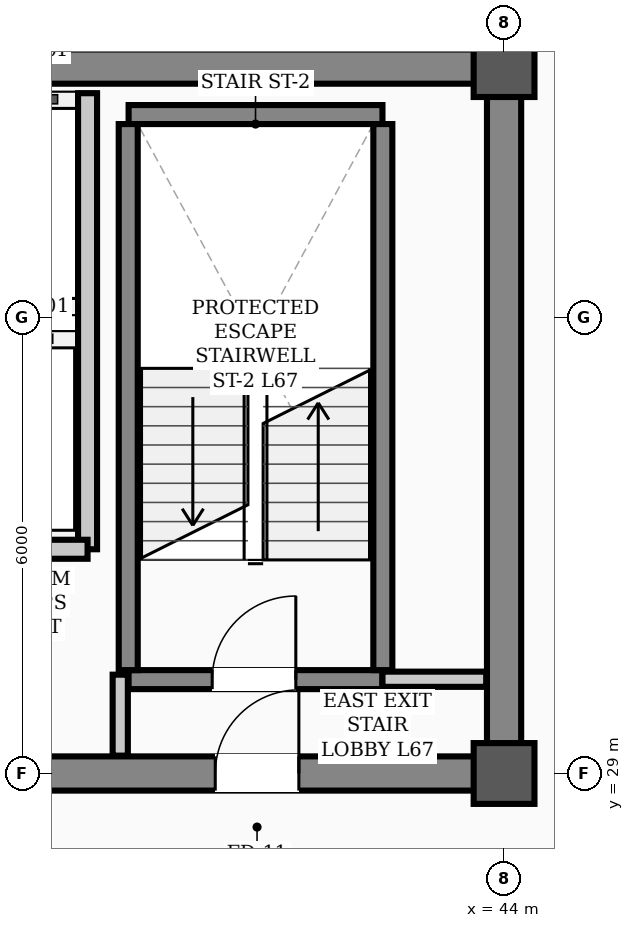
"""IFC4 building model, lengths in metres.
Left out: names, types, materials, properties, quantities, classifications, styles, units other than length and angle.
Written with IfcOpenShell. Run it as: python <this file> out.ifc"""

import sys

from ifc_helpers import new_model, si_unit, direction, frame, frame_2d, origin, origin_2d, place, context, subcontext, project, spatial, rectangle, hollow_rectangle, extrude, element, fill, save


model = new_model("IFC4")
c1 = context("Model", 3, precision=1e-05, world=origin(), true_north=direction((0.0, 1.0)))
c2 = subcontext(c1, "Body", "Model", "MODEL_VIEW")
j1 = project(units=[si_unit("LENGTHUNIT", "METRE"), si_unit("PLANEANGLEUNIT", "RADIAN")], contexts=[c1])
p1 = place(None, origin())
s1 = spatial("IfcSite", under=j1, at=p1, CompositionType="ELEMENT")
p2 = place(p1, origin())
s2 = spatial("IfcBuilding", under=s1, at=p2, CompositionType="ELEMENT")
p3 = place(p2, frame((0.0, 0.0, 269.6)))
s3 = spatial("IfcBuildingStorey", under=s2, at=p3, CompositionType="ELEMENT", Elevation=269.6)
for number, where, z_axis, x_axis in (
    (1, (44.0, 29.0, 0.0), (0.0, 0.0, 1.0), (1.0, 0.0, 0.0)),
    (2, (44.0, 38.3, 0.0), (0.0, 0.0, 1.0), (1.0, 0.0, 0.0)),
):
    element("IfcColumn", number, at=place(p3, frame(where, z_axis=z_axis, x_axis=x_axis)), inside=s3, PredefinedType="COLUMN", context=c2, shape_type="SweptSolid", body=[
        extrude(hollow_rectangle(XDim=0.8, YDim=0.8, WallThickness=0.032, InnerFilletRadius=0.016, OuterFilletRadius=0.048, at=origin_2d()), origin(), (0.0, 0.0, 1.0), 3.9),
    ])
p4 = place(p3, frame((13.5, 29.0, 0.0), z_axis=(0.0, 0.0, 1.0), x_axis=(1.0, 0.0, 0.0)))
e3 = element("IfcWall", 3, at=p4, inside=s3, PredefinedType="SHEAR", context=c2, shape_type="SweptSolid", body=[
    extrude(rectangle(XDim=30.5, YDim=0.45, at=frame_2d((15.25, 0.0))), origin(), (0.0, 0.0, 1.0), 3.72),
])
p5 = place(p4, frame((1.75, 0.0, 0.0)))
e4 = element("IfcOpeningElement", 4, at=p5, cuts=e3, PredefinedType="OPENING", context=c2, shape_type="SweptSolid", body=[
    extrude(rectangle(XDim=1.1, YDim=2.08, at=frame_2d((0.55, 1.04))), frame((0.0, 0.235, 0.0), z_axis=(0.0, -1.0, 0.0), x_axis=(1.0, 0.0, 0.0)), (0.0, 0.0, 1.0), 0.47),
])
p6 = place(p4, frame((26.7, 0.0, 0.0)))
e5 = element("IfcOpeningElement", 5, at=p6, cuts=e3, PredefinedType="OPENING", context=c2, shape_type="SweptSolid", body=[
    extrude(rectangle(XDim=1.1, YDim=2.08, at=frame_2d((0.55, 1.04))), frame((0.0, 0.235, 0.0), z_axis=(0.0, -1.0, 0.0), x_axis=(1.0, 0.0, 0.0)), (0.0, 0.0, 1.0), 0.47),
])
p7 = place(p4, frame((6.8, 0.0, 0.0)))
e6 = element("IfcOpeningElement", 6, at=p7, cuts=e3, PredefinedType="OPENING", context=c2, shape_type="SweptSolid", body=[
    extrude(rectangle(XDim=1.1, YDim=2.08, at=frame_2d((0.55, 1.04))), frame((0.0, 0.235, 0.0), z_axis=(0.0, -1.0, 0.0), x_axis=(1.0, 0.0, 0.0)), (0.0, 0.0, 1.0), 0.47),
])
p8 = place(p4, frame((13.2, 0.0, 0.0)))
e7 = element("IfcOpeningElement", 7, at=p8, cuts=e3, PredefinedType="OPENING", context=c2, shape_type="SweptSolid", body=[
    extrude(rectangle(XDim=1.6, YDim=2.08, at=frame_2d((0.8, 1.04))), frame((0.0, 0.235, 0.0), z_axis=(0.0, -1.0, 0.0), x_axis=(1.0, 0.0, 0.0)), (0.0, 0.0, 1.0), 0.47),
])
p9 = place(p4, frame((19.6, 0.0, 0.0)))
e8 = element("IfcOpeningElement", 8, at=p9, cuts=e3, PredefinedType="OPENING", context=c2, shape_type="SweptSolid", body=[
    extrude(rectangle(XDim=0.9, YDim=2.08, at=frame_2d((0.45, 1.04))), frame((0.0, 0.235, 0.0), z_axis=(0.0, -1.0, 0.0), x_axis=(1.0, 0.0, 0.0)), (0.0, 0.0, 1.0), 0.47),
])
p10 = place(p4, frame((21.6, 0.0, 0.0)))
e9 = element("IfcOpeningElement", 9, at=p10, cuts=e3, PredefinedType="OPENING", context=c2, shape_type="SweptSolid", body=[
    extrude(rectangle(XDim=0.9, YDim=2.08, at=frame_2d((0.45, 1.04))), frame((0.0, 0.235, 0.0), z_axis=(0.0, -1.0, 0.0), x_axis=(1.0, 0.0, 0.0)), (0.0, 0.0, 1.0), 0.47),
])
p11 = place(p3, frame((13.5, 38.3, 0.0), z_axis=(0.0, 0.0, 1.0), x_axis=(1.0, 0.0, 0.0)))
e10 = element("IfcWall", 10, at=p11, inside=s3, PredefinedType="SHEAR", context=c2, shape_type="SweptSolid", body=[
    extrude(rectangle(XDim=30.5, YDim=0.45, at=frame_2d((15.25, 0.0))), origin(), (0.0, 0.0, 1.0), 3.72),
])
p12 = place(p3, frame((44.0, 29.35, 0.0), z_axis=(0.0, 0.0, 1.0), x_axis=(0.0, 1.0, 0.0)))
e11 = element("IfcWall", 11, at=p12, inside=s3, PredefinedType="SHEAR", context=c2, shape_type="SweptSolid", body=[
    extrude(rectangle(XDim=8.6, YDim=0.45, at=frame_2d((4.3, 0.0))), origin(), (0.0, 0.0, 1.0), 3.72),
])
p13 = place(p3, frame((39.06, 30.235, 0.0), z_axis=(0.0, 0.0, 1.0), x_axis=(1.0, 0.0, 0.0)))
e12 = element("IfcWall", 12, at=p13, inside=s3, PredefinedType="STANDARD", context=c2, shape_type="SweptSolid", body=[
    extrude(rectangle(XDim=3.34, YDim=0.25, at=frame_2d((1.67, 0.0))), origin(), (0.0, 0.0, 1.0), 3.72),
])
p14 = place(p13, frame((1.1, 0.0, 0.0)))
e13 = element("IfcOpeningElement", 13, at=p14, cuts=e12, PredefinedType="OPENING", context=c2, shape_type="SweptSolid", body=[
    extrude(rectangle(XDim=1.1, YDim=2.08, at=frame_2d((0.55, 1.04))), frame((0.0, 0.135, 0.0), z_axis=(0.0, -1.0, 0.0), x_axis=(1.0, 0.0, 0.0)), (0.0, 0.0, 1.0), 0.27),
])
p15 = place(p3, frame((39.06, 37.669, 0.0), z_axis=(0.0, 0.0, 1.0), x_axis=(1.0, 0.0, 0.0)))
e14 = element("IfcWall", 14, at=p15, inside=s3, PredefinedType="STANDARD", context=c2, shape_type="SweptSolid", body=[
    extrude(rectangle(XDim=3.34, YDim=0.25, at=frame_2d((1.67, 0.0))), origin(), (0.0, 0.0, 1.0), 3.72),
])
for number, where, z_axis, x_axis in (
    (15, (39.055, 30.36, 0.0), (0.0, 0.0, 1.0), (0.0, 1.0, 0.0)),
    (16, (42.405, 30.36, 0.0), (0.0, 0.0, 1.0), (0.0, 1.0, 0.0)),
):
    element("IfcWall", number, at=place(p3, frame(where, z_axis=z_axis, x_axis=x_axis)), inside=s3, PredefinedType="STANDARD", context=c2, shape_type="SweptSolid", body=[
        extrude(rectangle(XDim=7.184, YDim=0.25, at=frame_2d((3.592, 0.0))), origin(), (0.0, 0.0, 1.0), 3.72),
    ])
p16 = place(p3, frame((38.52, 31.95, 0.0), z_axis=(0.0, 0.0, 1.0), x_axis=(0.0, 1.0, 0.0)))
e17 = element("IfcWall", 17, at=p16, inside=s3, PredefinedType="STANDARD", context=c2, shape_type="SweptSolid", body=[
    extrude(rectangle(XDim=6.0, YDim=0.25, at=frame_2d((3.0, 0.0))), origin(), (0.0, 0.0, 1.0), 3.48),
])
p17 = place(p3, frame((36.62, 31.95, 0.0), z_axis=(0.0, 0.0, 1.0), x_axis=(1.0, 0.0, 0.0)))
e18 = element("IfcWall", 18, at=p17, inside=s3, PredefinedType="STANDARD", context=c2, shape_type="SweptSolid", body=[
    extrude(rectangle(XDim=1.9, YDim=0.25, at=frame_2d((0.95, 0.0))), origin(), (0.0, 0.0, 1.0), 3.48),
])
p18 = place(p3, frame((42.4, 30.24, 0.0), z_axis=(0.0, 0.0, 1.0), x_axis=(1.0, 0.0, 0.0)))
e19 = element("IfcWall", 19, at=p18, inside=s3, PredefinedType="STANDARD", context=c2, shape_type="SweptSolid", body=[
    extrude(rectangle(XDim=1.365, YDim=0.2, at=frame_2d((0.683, 0.0))), origin(), (0.0, 0.0, 1.0), 3.72),
])
p19 = place(p3, frame((38.95, 29.235, 0.0), z_axis=(0.0, 0.0, 1.0), x_axis=(0.0, 1.0, 0.0)))
e20 = element("IfcWall", 20, at=p19, inside=s3, PredefinedType="STANDARD", context=c2, shape_type="SweptSolid", body=[
    extrude(rectangle(XDim=1.065, YDim=0.2, at=frame_2d((0.532, 0.0))), origin(), (0.0, 0.0, 1.0), 3.72),
])
p20 = place(p14, origin())
e21 = element("IfcDoor", 21, at=p20, inside=s3, OperationType="SINGLE_SWING_RIGHT", PredefinedType="DOOR", context=c2, shape_type="SweptSolid", body=[
    extrude(rectangle(XDim=1.1, YDim=2.08, at=frame_2d((0.55, 1.04))), frame((0.0, 0.025, 0.0), z_axis=(0.0, -1.0, 0.0), x_axis=(1.0, 0.0, 0.0)), (0.0, 0.0, 1.0), 0.05),
])
fill(e13, e21)
p21 = place(p6, origin())
e22 = element("IfcDoor", 22, at=p21, inside=s3, OperationType="SINGLE_SWING_RIGHT", PredefinedType="DOOR", context=c2, shape_type="SweptSolid", body=[
    extrude(rectangle(XDim=1.1, YDim=2.08, at=frame_2d((0.55, 1.04))), frame((0.0, 0.025, 0.0), z_axis=(0.0, -1.0, 0.0), x_axis=(1.0, 0.0, 0.0)), (0.0, 0.0, 1.0), 0.05),
])
fill(e5, e22)
save(model, sys.argv[1])
